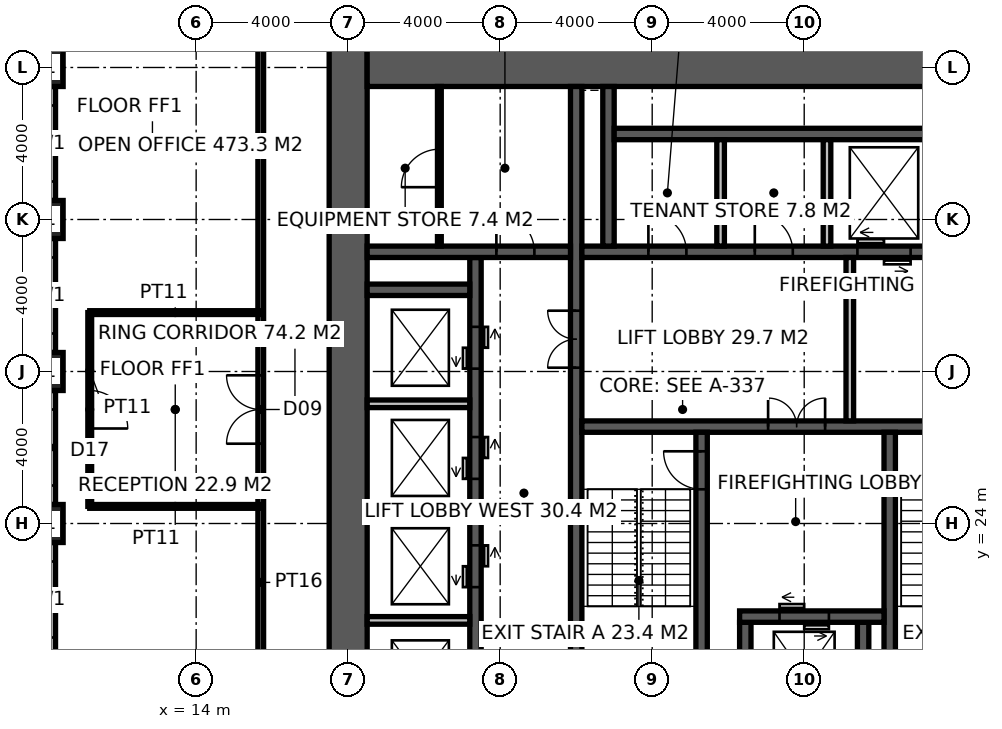
"""IFC4 building model, lengths in metres.
Left out: names, types, materials, properties, quantities, classifications, styles, units other than length and angle.
Written with IfcOpenShell. Run it as: python <this file> out.ifc"""

import sys

from ifc_helpers import new_model, si_unit, direction, frame, frame_2d, origin, origin_2d, place, context, subcontext, project, spatial, rectangle, hollow_rectangle, extrude, element, fill, save


model = new_model("IFC4")
c1 = context("Model", 3, precision=1e-05, world=origin(), true_north=direction((0.0, 1.0)))
c2 = subcontext(c1, "Body", "Model", "MODEL_VIEW")
j1 = project(units=[si_unit("LENGTHUNIT", "METRE"), si_unit("PLANEANGLEUNIT", "RADIAN")], contexts=[c1])
p1 = place(None, origin())
s1 = spatial("IfcSite", under=j1, at=p1, CompositionType="ELEMENT")
p2 = place(p1, origin())
s2 = spatial("IfcBuilding", under=s1, at=p2, CompositionType="ELEMENT")
p3 = place(p2, frame((0.0, 0.0, 230.2)))
s3 = spatial("IfcBuildingStorey", under=s2, at=p3, CompositionType="ELEMENT", Elevation=230.2)
for number, where, z_axis, x_axis in (
    (1, (10.0, 24.0, 0.0), (0.0, 0.0, 1.0), (1.0, 0.0, 0.0)),
    (2, (10.0, 28.0, 0.0), (0.0, 0.0, 1.0), (1.0, 0.0, 0.0)),
    (3, (10.0, 32.0, 0.0), (0.0, 0.0, 1.0), (1.0, 0.0, 0.0)),
    (4, (10.0, 36.0, 0.0), (0.0, 0.0, 1.0), (1.0, 0.0, 0.0)),
):
    element("IfcColumn", number, at=place(p3, frame(where, z_axis=z_axis, x_axis=x_axis)), inside=s3, PredefinedType="COLUMN", context=c2, shape_type="SweptSolid", body=[
        extrude(hollow_rectangle(XDim=1.0, YDim=1.0, WallThickness=0.1, at=origin_2d()), origin(), (0.0, 0.0, 1.0), 4.0),
    ])
p4 = place(p3, frame((18.0, 17.5, -0.15), z_axis=(0.0, 0.0, 1.0), x_axis=(0.0, 1.0, 0.0)))
e5 = element("IfcWall", 5, at=p4, inside=s3, PredefinedType="SHEAR", context=c2, shape_type="SweptSolid", body=[
    extrude(rectangle(XDim=19.0, YDim=1.0, at=frame_2d((9.5, 0.0))), origin(), (0.0, 0.0, 1.0), 4.0),
])
p5 = place(p3, frame((18.5, 36.0, -0.15), z_axis=(0.0, 0.0, 1.0), x_axis=(1.0, 0.0, 0.0)))
e6 = element("IfcWall", 6, at=p5, inside=s3, PredefinedType="SHEAR", context=c2, shape_type="SweptSolid", body=[
    extrude(rectangle(XDim=17.6, YDim=1.0, at=frame_2d((8.8, 0.0))), origin(), (0.0, 0.0, 1.0), 4.0),
])
p6 = place(p3, frame((24.0, 18.5, -0.15), z_axis=(0.0, 0.0, 1.0), x_axis=(0.0, 1.0, 0.0)))
e7 = element("IfcWall", 7, at=p6, inside=s3, PredefinedType="SHEAR", context=c2, shape_type="SweptSolid", body=[
    extrude(rectangle(XDim=17.0, YDim=0.3, at=frame_2d((8.5, 0.0))), origin(), (0.0, 0.0, 1.0), 4.0),
])
p7 = place(p6, frame((9.6, 0.0, 0.15)))
e8 = element("IfcOpeningElement", 8, at=p7, cuts=e7, PredefinedType="OPENING", context=c2, shape_type="SweptSolid", body=[
    extrude(rectangle(XDim=1.5, YDim=2.4, at=frame_2d((0.75, 1.2))), frame((0.0, 0.16, 0.0), z_axis=(0.0, -1.0, 0.0), x_axis=(1.0, 0.0, 0.0)), (0.0, 0.0, 1.0), 0.32),
])
p8 = place(p3, frame((24.15, 26.55, -0.15), z_axis=(0.0, 0.0, 1.0), x_axis=(1.0, 0.0, 0.0)))
e9 = element("IfcWall", 9, at=p8, inside=s3, PredefinedType="SHEAR", context=c2, shape_type="SweptSolid", body=[
    extrude(rectangle(XDim=11.25, YDim=0.3, at=frame_2d((5.625, 0.0))), origin(), (0.0, 0.0, 1.0), 4.0),
])
p9 = place(p8, frame((9.25, 0.0, 0.15)))
e10 = element("IfcOpeningElement", 10, at=p9, cuts=e9, PredefinedType="OPENING", context=c2, shape_type="SweptSolid", body=[
    extrude(rectangle(XDim=1.0, YDim=2.2, at=frame_2d((0.5, 1.1))), frame((0.0, 0.16, 0.0), z_axis=(0.0, -1.0, 0.0), x_axis=(1.0, 0.0, 0.0)), (0.0, 0.0, 1.0), 0.32),
])
p10 = place(p8, frame((4.9, 0.0, 0.15)))
e11 = element("IfcOpeningElement", 11, at=p10, cuts=e9, PredefinedType="OPENING", context=c2, shape_type="SweptSolid", body=[
    extrude(rectangle(XDim=1.5, YDim=2.4, at=frame_2d((0.75, 1.2))), frame((0.0, 0.16, 0.0), z_axis=(0.0, -1.0, 0.0), x_axis=(1.0, 0.0, 0.0)), (0.0, 0.0, 1.0), 0.32),
])
p11 = place(p3, frame((27.3, 18.5, -0.15), z_axis=(0.0, 0.0, 1.0), x_axis=(0.0, 1.0, 0.0)))
e12 = element("IfcWall", 12, at=p11, inside=s3, PredefinedType="SHEAR", context=c2, shape_type="SweptSolid", body=[
    extrude(rectangle(XDim=7.9, YDim=0.3, at=frame_2d((3.95, 0.0))), origin(), (0.0, 0.0, 1.0), 4.0),
])
p12 = place(p11, frame((6.4, 0.0, 0.15)))
e13 = element("IfcOpeningElement", 13, at=p12, cuts=e12, PredefinedType="OPENING", context=c2, shape_type="SweptSolid", body=[
    extrude(rectangle(XDim=1.0, YDim=2.2, at=frame_2d((0.5, 1.1))), frame((0.0, 0.16, 0.0), z_axis=(0.0, -1.0, 0.0), x_axis=(1.0, 0.0, 0.0)), (0.0, 0.0, 1.0), 0.32),
])
p13 = place(p3, frame((32.25, 18.5, -0.15), z_axis=(0.0, 0.0, 1.0), x_axis=(0.0, 1.0, 0.0)))
e14 = element("IfcWall", 14, at=p13, inside=s3, PredefinedType="SHEAR", context=c2, shape_type="SweptSolid", body=[
    extrude(rectangle(XDim=7.9, YDim=0.3, at=frame_2d((3.95, 0.0))), origin(), (0.0, 0.0, 1.0), 4.0),
])
for number, where, z_axis, x_axis in (
    (15, (28.45, 18.5, -0.15), (0.0, 0.0, 1.0), (0.0, 1.0, 0.0)),
    (16, (31.55, 18.5, -0.15), (0.0, 0.0, 1.0), (0.0, 1.0, 0.0)),
):
    element("IfcWall", number, at=place(p3, frame(where, z_axis=z_axis, x_axis=x_axis)), inside=s3, PredefinedType="SHEAR", context=c2, shape_type="SweptSolid", body=[
        extrude(rectangle(XDim=2.9, YDim=0.3, at=frame_2d((1.45, 0.0))), origin(), (0.0, 0.0, 1.0), 4.0),
    ])
p14 = place(p3, frame((28.3, 21.55, -0.15), z_axis=(0.0, 0.0, 1.0), x_axis=(1.0, 0.0, 0.0)))
e17 = element("IfcWall", 17, at=p14, inside=s3, PredefinedType="SHEAR", context=c2, shape_type="SweptSolid", body=[
    extrude(rectangle(XDim=3.8, YDim=0.3, at=frame_2d((1.9, 0.0))), origin(), (0.0, 0.0, 1.0), 4.0),
])
p15 = place(p14, frame((1.05, 0.0, 0.15)))
e18 = element("IfcOpeningElement", 18, at=p15, cuts=e17, PredefinedType="OPENING", context=c2, shape_type="SweptSolid", body=[
    extrude(rectangle(XDim=1.3, YDim=2.4, at=frame_2d((0.65, 1.2))), frame((0.0, 0.16, 0.0), z_axis=(0.0, -1.0, 0.0), x_axis=(1.0, 0.0, 0.0)), (0.0, 0.0, 1.0), 0.32),
])
p16 = place(p3, frame((24.15, 31.15, -0.15), z_axis=(0.0, 0.0, 1.0), x_axis=(1.0, 0.0, 0.0)))
e19 = element("IfcWall", 19, at=p16, inside=s3, PredefinedType="SHEAR", context=c2, shape_type="SweptSolid", body=[
    extrude(rectangle(XDim=11.25, YDim=0.3, at=frame_2d((5.625, 0.0))), origin(), (0.0, 0.0, 1.0), 4.0),
])
p17 = place(p16, frame((1.75, 0.0, 0.15)))
e20 = element("IfcOpeningElement", 20, at=p17, cuts=e19, PredefinedType="OPENING", context=c2, shape_type="SweptSolid", body=[
    extrude(rectangle(XDim=1.0, YDim=2.2, at=frame_2d((0.5, 1.1))), frame((0.0, 0.16, 0.0), z_axis=(0.0, -1.0, 0.0), x_axis=(1.0, 0.0, 0.0)), (0.0, 0.0, 1.0), 0.32),
])
p18 = place(p16, frame((4.55, 0.0, 0.15)))
e21 = element("IfcOpeningElement", 21, at=p18, cuts=e19, PredefinedType="OPENING", context=c2, shape_type="SweptSolid", body=[
    extrude(rectangle(XDim=1.0, YDim=2.2, at=frame_2d((0.5, 1.1))), frame((0.0, 0.16, 0.0), z_axis=(0.0, -1.0, 0.0), x_axis=(1.0, 0.0, 0.0)), (0.0, 0.0, 1.0), 0.32),
])
p19 = place(p16, frame((7.25, 0.0, 0.15)))
e22 = element("IfcOpeningElement", 22, at=p19, cuts=e19, PredefinedType="OPENING", context=c2, shape_type="SweptSolid", body=[
    extrude(rectangle(XDim=1.4, YDim=2.4, at=frame_2d((0.7, 1.2))), frame((0.0, 0.16, 0.0), z_axis=(0.0, -1.0, 0.0), x_axis=(1.0, 0.0, 0.0)), (0.0, 0.0, 1.0), 0.32),
])
p20 = place(p3, frame((21.35, 18.5, -0.15), z_axis=(0.0, 0.0, 1.0), x_axis=(0.0, 1.0, 0.0)))
e23 = element("IfcWall", 23, at=p20, inside=s3, PredefinedType="SHEAR", context=c2, shape_type="SweptSolid", body=[
    extrude(rectangle(XDim=12.5, YDim=0.3, at=frame_2d((6.25, 0.0))), origin(), (0.0, 0.0, 1.0), 4.0),
])
p21 = place(p20, frame((0.875, 0.0, 0.15)))
e24 = element("IfcOpeningElement", 24, at=p21, cuts=e23, PredefinedType="OPENING", context=c2, shape_type="SweptSolid", body=[
    extrude(rectangle(XDim=1.1, YDim=2.2, at=frame_2d((0.55, 1.1))), frame((0.0, 0.16, 0.0), z_axis=(0.0, -1.0, 0.0), x_axis=(1.0, 0.0, 0.0)), (0.0, 0.0, 1.0), 0.32),
])
p22 = place(p20, frame((3.825, 0.0, 0.15)))
e25 = element("IfcOpeningElement", 25, at=p22, cuts=e23, PredefinedType="OPENING", context=c2, shape_type="SweptSolid", body=[
    extrude(rectangle(XDim=1.1, YDim=2.2, at=frame_2d((0.55, 1.1))), frame((0.0, 0.16, 0.0), z_axis=(0.0, -1.0, 0.0), x_axis=(1.0, 0.0, 0.0)), (0.0, 0.0, 1.0), 0.32),
])
p23 = place(p20, frame((6.675, 0.0, 0.15)))
e26 = element("IfcOpeningElement", 26, at=p23, cuts=e23, PredefinedType="OPENING", context=c2, shape_type="SweptSolid", body=[
    extrude(rectangle(XDim=1.1, YDim=2.2, at=frame_2d((0.55, 1.1))), frame((0.0, 0.16, 0.0), z_axis=(0.0, -1.0, 0.0), x_axis=(1.0, 0.0, 0.0)), (0.0, 0.0, 1.0), 0.32),
])
p24 = place(p20, frame((9.575, 0.0, 0.15)))
e27 = element("IfcOpeningElement", 27, at=p24, cuts=e23, PredefinedType="OPENING", context=c2, shape_type="SweptSolid", body=[
    extrude(rectangle(XDim=1.1, YDim=2.2, at=frame_2d((0.55, 1.1))), frame((0.0, 0.16, 0.0), z_axis=(0.0, -1.0, 0.0), x_axis=(1.0, 0.0, 0.0)), (0.0, 0.0, 1.0), 0.32),
])
p25 = place(p3, frame((18.5, 31.15, -0.15), z_axis=(0.0, 0.0, 1.0), x_axis=(1.0, 0.0, 0.0)))
e28 = element("IfcWall", 28, at=p25, inside=s3, PredefinedType="SHEAR", context=c2, shape_type="SweptSolid", body=[
    extrude(rectangle(XDim=5.35, YDim=0.3, at=frame_2d((2.675, 0.0))), origin(), (0.0, 0.0, 1.0), 4.0),
])
p26 = place(p25, frame((3.4, 0.0, 0.15)))
e29 = element("IfcOpeningElement", 29, at=p26, cuts=e28, PredefinedType="OPENING", context=c2, shape_type="SweptSolid", body=[
    extrude(rectangle(XDim=1.0, YDim=2.2, at=frame_2d((0.5, 1.1))), frame((0.0, 0.16, 0.0), z_axis=(0.0, -1.0, 0.0), x_axis=(1.0, 0.0, 0.0)), (0.0, 0.0, 1.0), 0.32),
])
p27 = place(p3, frame((18.5, 30.15, -0.15), z_axis=(0.0, 0.0, 1.0), x_axis=(1.0, 0.0, 0.0)))
e30 = element("IfcWall", 30, at=p27, inside=s3, PredefinedType="SHEAR", context=c2, shape_type="SweptSolid", body=[
    extrude(rectangle(XDim=2.7, YDim=0.3, at=frame_2d((1.35, 0.0))), origin(), (0.0, 0.0, 1.0), 4.0),
])
p28 = place(p3, frame((24.85, 31.3, -0.15), z_axis=(0.0, 0.0, 1.0), x_axis=(0.0, 1.0, 0.0)))
e31 = element("IfcWall", 31, at=p28, inside=s3, PredefinedType="SHEAR", context=c2, shape_type="SweptSolid", body=[
    extrude(rectangle(XDim=4.2, YDim=0.3, at=frame_2d((2.1, 0.0))), origin(), (0.0, 0.0, 1.0), 4.0),
])
p29 = place(p3, frame((25.0, 34.25, -0.15), z_axis=(0.0, 0.0, 1.0), x_axis=(1.0, 0.0, 0.0)))
e32 = element("IfcWall", 32, at=p29, inside=s3, PredefinedType="SHEAR", context=c2, shape_type="SweptSolid", body=[
    extrude(rectangle(XDim=8.6, YDim=0.3, at=frame_2d((4.3, 0.0))), origin(), (0.0, 0.0, 1.0), 4.0),
])
for number, where, z_axis, x_axis in (
    (33, (27.8, 31.3, -0.15), (0.0, 0.0, 1.0), (0.0, 1.0, 0.0)),
    (34, (30.6, 31.3, -0.15), (0.0, 0.0, 1.0), (0.0, 1.0, 0.0)),
):
    element("IfcWall", number, at=place(p3, frame(where, z_axis=z_axis, x_axis=x_axis)), inside=s3, PredefinedType="SOLIDWALL", context=c2, shape_type="SweptSolid", body=[
        extrude(rectangle(XDim=2.8, YDim=0.2, at=frame_2d((1.4, 0.0))), origin(), (0.0, 0.0, 1.0), 4.0),
    ])
for number, where, z_axis, x_axis in (
    (35, (18.5, 21.45, -0.15), (0.0, 0.0, 1.0), (1.0, 0.0, 0.0)),
    (36, (18.5, 24.3, -0.15), (0.0, 0.0, 1.0), (1.0, 0.0, 0.0)),
    (37, (18.5, 27.15, -0.15), (0.0, 0.0, 1.0), (1.0, 0.0, 0.0)),
):
    element("IfcWall", number, at=place(p3, frame(where, z_axis=z_axis, x_axis=x_axis)), inside=s3, PredefinedType="SOLIDWALL", context=c2, shape_type="SweptSolid", body=[
        extrude(rectangle(XDim=2.7, YDim=0.2, at=frame_2d((1.35, 0.0))), origin(), (0.0, 0.0, 1.0), 4.0),
    ])
p30 = place(p3, frame((31.2, 26.7, 0.0), z_axis=(0.0, 0.0, 1.0), x_axis=(0.0, 1.0, 0.0)))
e38 = element("IfcWall", 38, at=p30, inside=s3, PredefinedType="SOLIDWALL", context=c2, shape_type="SweptSolid", body=[
    extrude(rectangle(XDim=4.3, YDim=0.2, at=frame_2d((2.15, 0.0))), origin(), (0.0, 0.0, 1.0), 3.85),
])
p31 = place(p3, frame((20.4, 31.3, 0.0), z_axis=(0.0, 0.0, 1.0), x_axis=(0.0, 1.0, 0.0)))
e39 = element("IfcWall", 39, at=p31, inside=s3, PredefinedType="PARTITIONING", context=c2, shape_type="SweptSolid", body=[
    extrude(rectangle(XDim=4.2, YDim=0.1, at=frame_2d((2.1, 0.0))), origin(), (0.0, 0.0, 1.0), 3.85),
])
p32 = place(p31, frame((1.55, 0.0, 0.0)))
e40 = element("IfcOpeningElement", 40, at=p32, cuts=e39, PredefinedType="OPENING", context=c2, shape_type="SweptSolid", body=[
    extrude(rectangle(XDim=1.0, YDim=2.2, at=frame_2d((0.5, 1.1))), frame((0.0, 0.06, 0.0), z_axis=(0.0, -1.0, 0.0), x_axis=(1.0, 0.0, 0.0)), (0.0, 0.0, 1.0), 0.12),
])
p33 = place(p3, frame((15.7, 15.625, 0.0), z_axis=(0.0, 0.0, 1.0), x_axis=(0.0, 1.0, 0.0)))
e41 = element("IfcWall", 41, at=p33, inside=s3, PredefinedType="PARTITIONING", context=c2, shape_type="SweptSolid", body=[
    extrude(rectangle(XDim=22.75, YDim=0.15, at=frame_2d((11.375, 0.0))), origin(), (0.0, 0.0, 1.0), 3.85),
])
p34 = place(p33, frame((10.475, 0.0, 0.0)))
e42 = element("IfcOpeningElement", 42, at=p34, cuts=e41, PredefinedType="OPENING", context=c2, shape_type="SweptSolid", body=[
    extrude(rectangle(XDim=1.8, YDim=2.4, at=frame_2d((0.9, 1.2))), frame((0.0, 0.085, 0.0), z_axis=(0.0, -1.0, 0.0), x_axis=(1.0, 0.0, 0.0)), (0.0, 0.0, 1.0), 0.17),
])
p35 = place(p3, frame((15.7, 29.55, 0.0), z_axis=(0.0, 0.0, 1.0), x_axis=(-1.0, 0.0, 0.0)))
e43 = element("IfcWall", 43, at=p35, inside=s3, PredefinedType="PARTITIONING", context=c2, shape_type="SweptSolid", body=[
    extrude(rectangle(XDim=4.5, YDim=0.1, at=frame_2d((2.25, 0.0))), origin(), (0.0, 0.0, 1.0), 3.85),
])
p36 = place(p3, frame((11.2, 29.55, 0.0), z_axis=(0.0, 0.0, 1.0), x_axis=(0.0, -1.0, 0.0)))
e44 = element("IfcWall", 44, at=p36, inside=s3, PredefinedType="PARTITIONING", context=c2, shape_type="SweptSolid", body=[
    extrude(rectangle(XDim=5.1, YDim=0.1, at=frame_2d((2.55, 0.0))), origin(), (0.0, 0.0, 1.0), 3.85),
])
p37 = place(p36, frame((2.05, 0.0, 0.0)))
e45 = element("IfcOpeningElement", 45, at=p37, cuts=e44, PredefinedType="OPENING", context=c2, shape_type="SweptSolid", body=[
    extrude(rectangle(XDim=1.0, YDim=2.2, at=frame_2d((0.5, 1.1))), frame((0.0, 0.06, 0.0), z_axis=(0.0, -1.0, 0.0), x_axis=(1.0, 0.0, 0.0)), (0.0, 0.0, 1.0), 0.12),
])
p38 = place(p3, frame((11.2, 24.45, 0.0), z_axis=(0.0, 0.0, 1.0), x_axis=(1.0, 0.0, 0.0)))
e46 = element("IfcWall", 46, at=p38, inside=s3, PredefinedType="PARTITIONING", context=c2, shape_type="SweptSolid", body=[
    extrude(rectangle(XDim=4.5, YDim=0.1, at=frame_2d((2.25, 0.0))), origin(), (0.0, 0.0, 1.0), 2.95),
])
p39 = place(p3, frame((10.15, 23.5, 0.0), z_axis=(0.0, 0.0, 1.0), x_axis=(0.0, -1.0, 0.0)))
e47 = element("IfcWall", 47, at=p39, inside=s3, PredefinedType="ELEMENTEDWALL", context=c2, shape_type="SweptSolid", body=[
    extrude(rectangle(XDim=3.0, YDim=0.3, at=frame_2d((1.5, 0.0))), origin(), (0.0, 0.0, 1.0), 2.85),
])
p40 = place(p39, frame((0.5, 0.0, 0.8)))
e48 = element("IfcOpeningElement", 48, at=p40, cuts=e47, PredefinedType="OPENING", context=c2, shape_type="SweptSolid", body=[
    extrude(rectangle(XDim=2.0, YDim=2.0, at=frame_2d((1.0, 1.0))), frame((0.0, 0.16, 0.0), z_axis=(0.0, -1.0, 0.0), x_axis=(1.0, 0.0, 0.0)), (0.0, 0.0, 1.0), 0.32),
])
p41 = place(p3, frame((10.15, 27.5, 0.0), z_axis=(0.0, 0.0, 1.0), x_axis=(0.0, -1.0, 0.0)))
e49 = element("IfcWall", 49, at=p41, inside=s3, PredefinedType="ELEMENTEDWALL", context=c2, shape_type="SweptSolid", body=[
    extrude(rectangle(XDim=3.0, YDim=0.3, at=frame_2d((1.5, 0.0))), origin(), (0.0, 0.0, 1.0), 2.85),
])
p42 = place(p41, frame((0.5, 0.0, 0.8)))
e50 = element("IfcOpeningElement", 50, at=p42, cuts=e49, PredefinedType="OPENING", context=c2, shape_type="SweptSolid", body=[
    extrude(rectangle(XDim=2.0, YDim=2.0, at=frame_2d((1.0, 1.0))), frame((0.0, 0.16, 0.0), z_axis=(0.0, -1.0, 0.0), x_axis=(1.0, 0.0, 0.0)), (0.0, 0.0, 1.0), 0.32),
])
p43 = place(p3, frame((10.15, 31.5, 0.0), z_axis=(0.0, 0.0, 1.0), x_axis=(0.0, -1.0, 0.0)))
e51 = element("IfcWall", 51, at=p43, inside=s3, PredefinedType="ELEMENTEDWALL", context=c2, shape_type="SweptSolid", body=[
    extrude(rectangle(XDim=3.0, YDim=0.3, at=frame_2d((1.5, 0.0))), origin(), (0.0, 0.0, 1.0), 2.85),
])
p44 = place(p43, frame((0.5, 0.0, 0.8)))
e52 = element("IfcOpeningElement", 52, at=p44, cuts=e51, PredefinedType="OPENING", context=c2, shape_type="SweptSolid", body=[
    extrude(rectangle(XDim=2.0, YDim=2.0, at=frame_2d((1.0, 1.0))), frame((0.0, 0.16, 0.0), z_axis=(0.0, -1.0, 0.0), x_axis=(1.0, 0.0, 0.0)), (0.0, 0.0, 1.0), 0.32),
])
p45 = place(p3, frame((10.15, 35.5, 0.0), z_axis=(0.0, 0.0, 1.0), x_axis=(0.0, -1.0, 0.0)))
e53 = element("IfcWall", 53, at=p45, inside=s3, PredefinedType="ELEMENTEDWALL", context=c2, shape_type="SweptSolid", body=[
    extrude(rectangle(XDim=3.0, YDim=0.3, at=frame_2d((1.5, 0.0))), origin(), (0.0, 0.0, 1.0), 2.85),
])
p46 = place(p45, frame((0.5, 0.0, 0.8)))
e54 = element("IfcOpeningElement", 54, at=p46, cuts=e53, PredefinedType="OPENING", context=c2, shape_type="SweptSolid", body=[
    extrude(rectangle(XDim=2.0, YDim=2.0, at=frame_2d((1.0, 1.0))), frame((0.0, 0.16, 0.0), z_axis=(0.0, -1.0, 0.0), x_axis=(1.0, 0.0, 0.0)), (0.0, 0.0, 1.0), 0.32),
])
p47 = place(p12, origin())
e55 = element("IfcDoor", 55, at=p47, inside=s3, OperationType="SINGLE_SWING_RIGHT", PredefinedType="DOOR", context=c2, shape_type="SweptSolid", body=[
    extrude(rectangle(XDim=1.0, YDim=2.2, at=frame_2d((0.5, 1.1))), frame((0.0, 0.025, 0.0), z_axis=(0.0, -1.0, 0.0), x_axis=(1.0, 0.0, 0.0)), (0.0, 0.0, 1.0), 0.05),
])
fill(e13, e55)
p48 = place(p10, origin())
e56 = element("IfcDoor", 56, at=p48, inside=s3, OperationType="DOUBLE_DOOR_DOUBLE_SWING", PredefinedType="DOOR", context=c2, shape_type="SweptSolid", body=[
    extrude(rectangle(XDim=1.5, YDim=2.4, at=frame_2d((0.75, 1.2))), frame((0.0, 0.025, 0.0), z_axis=(0.0, -1.0, 0.0), x_axis=(1.0, 0.0, 0.0)), (0.0, 0.0, 1.0), 0.05),
])
fill(e11, e56)
p49 = place(p7, origin())
e57 = element("IfcDoor", 57, at=p49, inside=s3, OperationType="DOUBLE_DOOR_DOUBLE_SWING", PredefinedType="DOOR", context=c2, shape_type="SweptSolid", body=[
    extrude(rectangle(XDim=1.5, YDim=2.4, at=frame_2d((0.75, 1.2))), frame((0.0, 0.025, 0.0), z_axis=(0.0, -1.0, 0.0), x_axis=(1.0, 0.0, 0.0)), (0.0, 0.0, 1.0), 0.05),
])
fill(e8, e57)
p50 = place(p26, origin())
e58 = element("IfcDoor", 58, at=p50, inside=s3, OperationType="SINGLE_SWING_LEFT", PredefinedType="DOOR", context=c2, shape_type="SweptSolid", body=[
    extrude(rectangle(XDim=1.0, YDim=2.2, at=frame_2d((0.5, 1.1))), frame((0.0, 0.025, 0.0), z_axis=(0.0, -1.0, 0.0), x_axis=(1.0, 0.0, 0.0)), (0.0, 0.0, 1.0), 0.05),
])
fill(e29, e58)
p51 = place(p32, origin())
e59 = element("IfcDoor", 59, at=p51, inside=s3, OperationType="SINGLE_SWING_LEFT", PredefinedType="DOOR", context=c2, shape_type="SweptSolid", body=[
    extrude(rectangle(XDim=1.0, YDim=2.2, at=frame_2d((0.5, 1.1))), frame((0.0, 0.025, 0.0), z_axis=(0.0, -1.0, 0.0), x_axis=(1.0, 0.0, 0.0)), (0.0, 0.0, 1.0), 0.05),
])
fill(e40, e59)
p52 = place(p17, origin())
e60 = element("IfcDoor", 60, at=p52, inside=s3, OperationType="SINGLE_SWING_LEFT", PredefinedType="DOOR", context=c2, shape_type="SweptSolid", body=[
    extrude(rectangle(XDim=1.0, YDim=2.2, at=frame_2d((0.5, 1.1))), frame((0.0, 0.025, 0.0), z_axis=(0.0, -1.0, 0.0), x_axis=(1.0, 0.0, 0.0)), (0.0, 0.0, 1.0), 0.05),
])
fill(e20, e60)
p53 = place(p18, origin())
e61 = element("IfcDoor", 61, at=p53, inside=s3, OperationType="SINGLE_SWING_LEFT", PredefinedType="DOOR", context=c2, shape_type="SweptSolid", body=[
    extrude(rectangle(XDim=1.0, YDim=2.2, at=frame_2d((0.5, 1.1))), frame((0.0, 0.025, 0.0), z_axis=(0.0, -1.0, 0.0), x_axis=(1.0, 0.0, 0.0)), (0.0, 0.0, 1.0), 0.05),
])
fill(e21, e61)
p54 = place(p34, origin())
e62 = element("IfcDoor", 62, at=p54, inside=s3, OperationType="DOUBLE_DOOR_DOUBLE_SWING", PredefinedType="DOOR", context=c2, shape_type="SweptSolid", body=[
    extrude(rectangle(XDim=1.8, YDim=2.4, at=frame_2d((0.9, 1.2))), frame((0.0, 0.025, 0.0), z_axis=(0.0, -1.0, 0.0), x_axis=(1.0, 0.0, 0.0)), (0.0, 0.0, 1.0), 0.05),
])
fill(e42, e62)
p55 = place(p37, origin())
e63 = element("IfcDoor", 63, at=p55, inside=s3, OperationType="SINGLE_SWING_RIGHT", PredefinedType="DOOR", context=c2, shape_type="SweptSolid", body=[
    extrude(rectangle(XDim=1.0, YDim=2.2, at=frame_2d((0.5, 1.1))), frame((0.0, 0.025, 0.0), z_axis=(0.0, -1.0, 0.0), x_axis=(1.0, 0.0, 0.0)), (0.0, 0.0, 1.0), 0.05),
])
fill(e45, e63)
p56 = place(p15, origin())
e64 = element("IfcDoor", 64, at=p56, inside=s3, OperationType="DOUBLE_DOOR_SLIDING", PredefinedType="DOOR", context=c2, shape_type="SweptSolid", body=[
    extrude(rectangle(XDim=1.3, YDim=2.4, at=frame_2d((0.65, 1.2))), frame((0.0, 0.025, 0.0), z_axis=(0.0, -1.0, 0.0), x_axis=(1.0, 0.0, 0.0)), (0.0, 0.0, 1.0), 0.05),
])
fill(e18, e64)
p57 = place(p19, origin())
e65 = element("IfcDoor", 65, at=p57, inside=s3, OperationType="DOUBLE_DOOR_SLIDING", PredefinedType="DOOR", context=c2, shape_type="SweptSolid", body=[
    extrude(rectangle(XDim=1.4, YDim=2.4, at=frame_2d((0.7, 1.2))), frame((0.0, 0.025, 0.0), z_axis=(0.0, -1.0, 0.0), x_axis=(1.0, 0.0, 0.0)), (0.0, 0.0, 1.0), 0.05),
])
fill(e22, e65)
p58 = place(p22, origin())
e66 = element("IfcDoor", 66, at=p58, inside=s3, OperationType="DOUBLE_DOOR_SLIDING", PredefinedType="DOOR", context=c2, shape_type="SweptSolid", body=[
    extrude(rectangle(XDim=1.1, YDim=2.2, at=frame_2d((0.55, 1.1))), frame((0.0, 0.025, 0.0), z_axis=(0.0, -1.0, 0.0), x_axis=(1.0, 0.0, 0.0)), (0.0, 0.0, 1.0), 0.05),
])
fill(e25, e66)
p59 = place(p23, origin())
e67 = element("IfcDoor", 67, at=p59, inside=s3, OperationType="DOUBLE_DOOR_SLIDING", PredefinedType="DOOR", context=c2, shape_type="SweptSolid", body=[
    extrude(rectangle(XDim=1.1, YDim=2.2, at=frame_2d((0.55, 1.1))), frame((0.0, 0.025, 0.0), z_axis=(0.0, -1.0, 0.0), x_axis=(1.0, 0.0, 0.0)), (0.0, 0.0, 1.0), 0.05),
])
fill(e26, e67)
p60 = place(p24, origin())
e68 = element("IfcDoor", 68, at=p60, inside=s3, OperationType="DOUBLE_DOOR_SLIDING", PredefinedType="DOOR", context=c2, shape_type="SweptSolid", body=[
    extrude(rectangle(XDim=1.1, YDim=2.2, at=frame_2d((0.55, 1.1))), frame((0.0, 0.025, 0.0), z_axis=(0.0, -1.0, 0.0), x_axis=(1.0, 0.0, 0.0)), (0.0, 0.0, 1.0), 0.05),
])
fill(e27, e68)
save(model, sys.argv[1])
